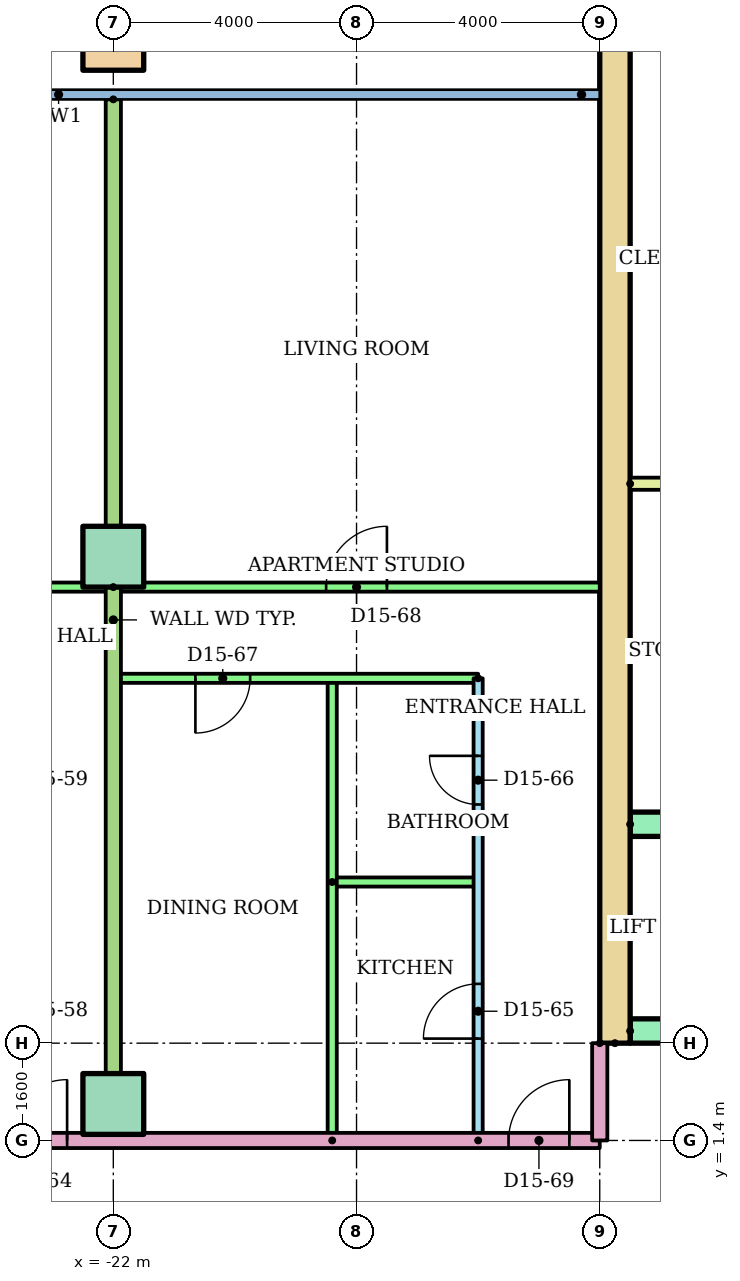
"""IFC4 building model, lengths in metres.
Left out: names, types, materials, properties, quantities, classifications, styles, units other than length and angle.
Written with IfcOpenShell. Run it as: python <this file> out.ifc"""

import sys

from ifc_helpers import new_model, si_unit, direction, frame, frame_2d, origin, origin_2d, place, context, subcontext, project, spatial, rectangle, hollow_rectangle, extrude, element, fill, save


model = new_model("IFC4")
c1 = context("Model", 3, precision=1e-05, world=origin(), true_north=direction((0.0, 1.0)))
c2 = subcontext(c1, "Body", "Model", "MODEL_VIEW")
j1 = project(units=[si_unit("LENGTHUNIT", "METRE"), si_unit("PLANEANGLEUNIT", "RADIAN")], contexts=[c1])
p1 = place(None, origin())
s1 = spatial("IfcSite", under=j1, at=p1, CompositionType="ELEMENT")
p2 = place(p1, origin())
s2 = spatial("IfcBuilding", under=s1, at=p2, CompositionType="ELEMENT")
p3 = place(p2, frame((0.0, 0.0, 57.6)))
s3 = spatial("IfcBuildingStorey", under=s2, at=p3, CompositionType="ELEMENT", Elevation=57.6)
for number, where in (
    (1, (-22.0, 2.0, 0.0)),
    (2, (-22.0, 11.0, 0.0)),
):
    element("IfcColumn", number, at=place(p3, frame(where)), inside=s3, PredefinedType="COLUMN", context=c2, shape_type="SweptSolid", body=[
        extrude(rectangle(XDim=1.0, YDim=1.0, at=origin_2d()), origin(), (0.0, 0.0, 1.0), 3.2),
    ])
p4 = place(p3, frame((-22.0, 19.5, 0.0)))
e3 = element("IfcColumn", 3, at=p4, inside=s3, PredefinedType="COLUMN", context=c2, shape_type="SweptSolid", body=[
    extrude(hollow_rectangle(XDim=1.0, YDim=1.0, WallThickness=0.05, at=origin_2d()), origin(), (0.0, 0.0, 1.0), 3.2),
])
p5 = place(p3, frame((-13.75, 3.0, 0.0), z_axis=(0.0, 0.0, 1.0), x_axis=(0.0, 1.0, 0.0)))
e4 = element("IfcWall", 4, at=p5, inside=s3, PredefinedType="SHEAR", context=c2, shape_type="SweptSolid", body=[
    extrude(rectangle(XDim=17.0, YDim=0.5, at=frame_2d((8.5, 0.0))), origin(), (0.0, 0.0, 1.0), 2.92),
])
p6 = place(p3, frame((-13.5, 3.2, 0.0)))
e5 = element("IfcWall", 5, at=p6, inside=s3, PredefinedType="SHEAR", context=c2, shape_type="SweptSolid", body=[
    extrude(rectangle(XDim=27.0, YDim=0.4, at=frame_2d((13.5, 0.0))), origin(), (0.0, 0.0, 1.0), 2.92),
])
p7 = place(p6, frame((6.861, 0.0, 0.0)))
e6 = element("IfcOpeningElement", 6, at=p7, cuts=e5, PredefinedType="OPENING", context=c2, shape_type="SweptSolid", body=[
    extrude(rectangle(XDim=1.1, YDim=2.1, at=frame_2d((0.55, 1.05))), frame((0.0, 0.21, 0.0), z_axis=(0.0, -1.0, 0.0), x_axis=(1.0, 0.0, 0.0)), (0.0, 0.0, 1.0), 0.42),
])
p8 = place(p6, frame((9.906, 0.0, 0.0)))
e7 = element("IfcOpeningElement", 7, at=p8, cuts=e5, PredefinedType="OPENING", context=c2, shape_type="SweptSolid", body=[
    extrude(rectangle(XDim=1.1, YDim=2.1, at=frame_2d((0.55, 1.05))), frame((0.0, 0.21, 0.0), z_axis=(0.0, -1.0, 0.0), x_axis=(1.0, 0.0, 0.0)), (0.0, 0.0, 1.0), 0.42),
])
p9 = place(p6, frame((15.994, 0.0, 0.0)))
e8 = element("IfcOpeningElement", 8, at=p9, cuts=e5, PredefinedType="OPENING", context=c2, shape_type="SweptSolid", body=[
    extrude(rectangle(XDim=1.1, YDim=2.1, at=frame_2d((0.55, 1.05))), frame((0.0, 0.21, 0.0), z_axis=(0.0, -1.0, 0.0), x_axis=(1.0, 0.0, 0.0)), (0.0, 0.0, 1.0), 0.42),
])
p10 = place(p6, frame((19.039, 0.0, 0.0)))
e9 = element("IfcOpeningElement", 9, at=p10, cuts=e5, PredefinedType="OPENING", context=c2, shape_type="SweptSolid", body=[
    extrude(rectangle(XDim=1.1, YDim=2.1, at=frame_2d((0.55, 1.05))), frame((0.0, 0.21, 0.0), z_axis=(0.0, -1.0, 0.0), x_axis=(1.0, 0.0, 0.0)), (0.0, 0.0, 1.0), 0.42),
])
p11 = place(p6, frame((12.6, 0.0, 0.0)))
e10 = element("IfcOpeningElement", 10, at=p11, cuts=e5, PredefinedType="OPENING", context=c2, shape_type="SweptSolid", body=[
    extrude(rectangle(XDim=1.8, YDim=2.1, at=frame_2d((0.9, 1.05))), frame((0.0, 0.21, 0.0), z_axis=(0.0, -1.0, 0.0), x_axis=(1.0, 0.0, 0.0)), (0.0, 0.0, 1.0), 0.42),
])
p12 = place(p3, frame((-13.5, 6.6, 0.0)))
e11 = element("IfcWall", 11, at=p12, inside=s3, PredefinedType="SHEAR", context=c2, shape_type="SweptSolid", body=[
    extrude(rectangle(XDim=11.978, YDim=0.4, at=frame_2d((5.989, 0.0))), origin(), (0.0, 0.0, 1.0), 2.92),
])
p13 = place(p3, frame((-13.5, 12.2, 0.0)))
e12 = element("IfcWall", 12, at=p13, inside=s3, PredefinedType="PARTITIONING", context=c2, shape_type="SweptSolid", body=[
    extrude(rectangle(XDim=3.9, YDim=0.2, at=frame_2d((1.95, 0.0))), origin(), (0.0, 0.0, 1.0), 2.92),
])
p14 = place(p3, frame((-36.52, 10.5, 0.0)))
e13 = element("IfcWall", 13, at=p14, inside=s3, PredefinedType="PARTITIONING", context=c2, shape_type="SweptSolid", body=[
    extrude(rectangle(XDim=14.52, YDim=0.15, at=frame_2d((7.26, 0.0))), origin(), (0.0, 0.0, 1.0), 2.4),
])
p15 = place(p14, frame((1.97, 0.0, 0.0)))
e14 = element("IfcOpeningElement", 14, at=p15, cuts=e13, PredefinedType="OPENING", context=c2, shape_type="SweptSolid", body=[
    extrude(rectangle(XDim=1.0, YDim=2.1, at=frame_2d((0.5, 1.05))), frame((0.0, 0.085, 0.0), z_axis=(0.0, -1.0, 0.0), x_axis=(1.0, 0.0, 0.0)), (0.0, 0.0, 1.0), 0.17),
])
p16 = place(p14, frame((9.12, 0.0, 0.0)))
e15 = element("IfcOpeningElement", 15, at=p16, cuts=e13, PredefinedType="OPENING", context=c2, shape_type="SweptSolid", body=[
    extrude(rectangle(XDim=1.0, YDim=2.1, at=frame_2d((0.5, 1.05))), frame((0.0, 0.085, 0.0), z_axis=(0.0, -1.0, 0.0), x_axis=(1.0, 0.0, 0.0)), (0.0, 0.0, 1.0), 0.17),
])
p17 = place(p3, frame((-16.0, 1.4, 0.0), z_axis=(0.0, 0.0, 1.0), x_axis=(0.0, 1.0, 0.0)))
e16 = element("IfcWall", 16, at=p17, inside=s3, PredefinedType="PARTITIONING", context=c2, shape_type="SweptSolid", body=[
    extrude(rectangle(XDim=7.6, YDim=0.15, at=frame_2d((3.8, 0.0))), origin(), (0.0, 0.0, 1.0), 2.4),
])
p18 = place(p17, frame((1.675, 0.0, 0.0)))
e17 = element("IfcOpeningElement", 17, at=p18, cuts=e16, PredefinedType="OPENING", context=c2, shape_type="SweptSolid", body=[
    extrude(rectangle(XDim=0.9, YDim=2.1, at=frame_2d((0.45, 1.05))), frame((0.0, 0.085, 0.0), z_axis=(0.0, -1.0, 0.0), x_axis=(1.0, 0.0, 0.0)), (0.0, 0.0, 1.0), 0.17),
])
p19 = place(p17, frame((5.525, 0.0, 0.0)))
e18 = element("IfcOpeningElement", 18, at=p19, cuts=e16, PredefinedType="OPENING", context=c2, shape_type="SweptSolid", body=[
    extrude(rectangle(XDim=0.8, YDim=2.1, at=frame_2d((0.4, 1.05))), frame((0.0, 0.085, 0.0), z_axis=(0.0, -1.0, 0.0), x_axis=(1.0, 0.0, 0.0)), (0.0, 0.0, 1.0), 0.17),
])
p20 = place(p3, frame((-18.4, 5.65, 0.0)))
e19 = element("IfcWall", 19, at=p20, inside=s3, PredefinedType="PARTITIONING", context=c2, shape_type="SweptSolid", body=[
    extrude(rectangle(XDim=2.4, YDim=0.15, at=frame_2d((1.2, 0.0))), origin(), (0.0, 0.0, 1.0), 2.4),
])
p21 = place(p3, frame((-18.4, 1.4, 0.0), z_axis=(0.0, 0.0, 1.0), x_axis=(0.0, 1.0, 0.0)))
e20 = element("IfcWall", 20, at=p21, inside=s3, PredefinedType="PARTITIONING", context=c2, shape_type="SweptSolid", body=[
    extrude(rectangle(XDim=7.6, YDim=0.15, at=frame_2d((3.8, 0.0))), origin(), (0.0, 0.0, 1.0), 2.4),
])
p22 = place(p3, frame((-16.0, 9.0, 0.0), z_axis=(0.0, 0.0, 1.0), x_axis=(-1.0, 0.0, 0.0)))
e21 = element("IfcWall", 21, at=p22, inside=s3, PredefinedType="PARTITIONING", context=c2, shape_type="SweptSolid", body=[
    extrude(rectangle(XDim=6.0, YDim=0.15, at=frame_2d((3.0, 0.0))), origin(), (0.0, 0.0, 1.0), 2.4),
])
p23 = place(p22, frame((3.75, 0.0, 0.0)))
e22 = element("IfcOpeningElement", 22, at=p23, cuts=e21, PredefinedType="OPENING", context=c2, shape_type="SweptSolid", body=[
    extrude(rectangle(XDim=0.9, YDim=2.1, at=frame_2d((0.45, 1.05))), frame((0.0, 0.085, 0.0), z_axis=(0.0, -1.0, 0.0), x_axis=(1.0, 0.0, 0.0)), (0.0, 0.0, 1.0), 0.17),
])
p24 = place(p3, frame((-22.0, 10.5, 0.0)))
e23 = element("IfcWall", 23, at=p24, inside=s3, PredefinedType="PARTITIONING", context=c2, shape_type="SweptSolid", body=[
    extrude(rectangle(XDim=8.0, YDim=0.15, at=frame_2d((4.0, 0.0))), origin(), (0.0, 0.0, 1.0), 2.4),
])
p25 = place(p24, frame((3.5, 0.0, 0.0)))
e24 = element("IfcOpeningElement", 24, at=p25, cuts=e23, PredefinedType="OPENING", context=c2, shape_type="SweptSolid", body=[
    extrude(rectangle(XDim=1.0, YDim=2.1, at=frame_2d((0.5, 1.05))), frame((0.0, 0.085, 0.0), z_axis=(0.0, -1.0, 0.0), x_axis=(1.0, 0.0, 0.0)), (0.0, 0.0, 1.0), 0.17),
])
p26 = place(p3, frame((-22.0, 18.521, 0.0), z_axis=(0.0, 0.0, 1.0), x_axis=(0.0, -1.0, 0.0)))
e25 = element("IfcWall", 25, at=p26, inside=s3, PredefinedType="PARTITIONING", context=c2, shape_type="SweptSolid", body=[
    extrude(rectangle(XDim=17.121, YDim=0.25, at=frame_2d((8.561, 0.0))), origin(), (0.0, 0.0, 1.0), 2.4),
])
p27 = place(p3, frame((-29.0, 1.4, 0.0)))
e26 = element("IfcWall", 26, at=p27, inside=s3, PredefinedType="PARTITIONING", context=c2, shape_type="SweptSolid", body=[
    extrude(rectangle(XDim=15.0, YDim=0.25, at=frame_2d((7.5, 0.0))), origin(), (0.0, 0.0, 1.0), 2.4),
])
p28 = place(p27, frame((5.24, 0.0, 0.0)))
e27 = element("IfcOpeningElement", 27, at=p28, cuts=e26, PredefinedType="OPENING", context=c2, shape_type="SweptSolid", body=[
    extrude(rectangle(XDim=1.0, YDim=2.1, at=frame_2d((0.5, 1.05))), frame((0.0, 0.135, 0.0), z_axis=(0.0, -1.0, 0.0), x_axis=(1.0, 0.0, 0.0)), (0.0, 0.0, 1.0), 0.27),
])
p29 = place(p27, frame((13.5, 0.0, 0.0)))
e28 = element("IfcOpeningElement", 28, at=p29, cuts=e26, PredefinedType="OPENING", context=c2, shape_type="SweptSolid", body=[
    extrude(rectangle(XDim=1.0, YDim=2.1, at=frame_2d((0.5, 1.05))), frame((0.0, 0.135, 0.0), z_axis=(0.0, -1.0, 0.0), x_axis=(1.0, 0.0, 0.0)), (0.0, 0.0, 1.0), 0.27),
])
p30 = place(p3, frame((-14.0, 3.0, 0.0), z_axis=(0.0, 0.0, 1.0), x_axis=(0.0, -1.0, 0.0)))
e29 = element("IfcWall", 29, at=p30, inside=s3, PredefinedType="PARTITIONING", context=c2, shape_type="SweptSolid", body=[
    extrude(rectangle(XDim=1.6, YDim=0.25, at=frame_2d((0.8, 0.0))), origin(), (0.0, 0.0, 1.0), 2.4),
])
p31 = place(p28, origin())
e30 = element("IfcDoor", 30, at=p31, inside=s3, OperationType="SINGLE_SWING_RIGHT", PredefinedType="DOOR", context=c2, shape_type="SweptSolid", body=[
    extrude(rectangle(XDim=1.0, YDim=2.1, at=frame_2d((0.5, 1.05))), frame((0.0, 0.025, 0.0), z_axis=(0.0, -1.0, 0.0), x_axis=(1.0, 0.0, 0.0)), (0.0, 0.0, 1.0), 0.05),
])
fill(e27, e30)
p32 = place(p18, origin())
e31 = element("IfcDoor", 31, at=p32, inside=s3, OperationType="SINGLE_SWING_LEFT", PredefinedType="DOOR", context=c2, shape_type="SweptSolid", body=[
    extrude(rectangle(XDim=0.9, YDim=2.1, at=frame_2d((0.45, 1.05))), frame((0.0, 0.025, 0.0), z_axis=(0.0, -1.0, 0.0), x_axis=(1.0, 0.0, 0.0)), (0.0, 0.0, 1.0), 0.05),
])
fill(e17, e31)
p33 = place(p19, origin())
e32 = element("IfcDoor", 32, at=p33, inside=s3, OperationType="SINGLE_SWING_RIGHT", PredefinedType="DOOR", context=c2, shape_type="SweptSolid", body=[
    extrude(rectangle(XDim=0.8, YDim=2.1, at=frame_2d((0.4, 1.05))), frame((0.0, 0.025, 0.0), z_axis=(0.0, -1.0, 0.0), x_axis=(1.0, 0.0, 0.0)), (0.0, 0.0, 1.0), 0.05),
])
fill(e18, e32)
p34 = place(p23, origin())
e33 = element("IfcDoor", 33, at=p34, inside=s3, OperationType="SINGLE_SWING_RIGHT", PredefinedType="DOOR", context=c2, shape_type="SweptSolid", body=[
    extrude(rectangle(XDim=0.9, YDim=2.1, at=frame_2d((0.45, 1.05))), frame((0.0, 0.025, 0.0), z_axis=(0.0, -1.0, 0.0), x_axis=(1.0, 0.0, 0.0)), (0.0, 0.0, 1.0), 0.05),
])
fill(e22, e33)
p35 = place(p25, origin())
e34 = element("IfcDoor", 34, at=p35, inside=s3, OperationType="SINGLE_SWING_RIGHT", PredefinedType="DOOR", context=c2, shape_type="SweptSolid", body=[
    extrude(rectangle(XDim=1.0, YDim=2.1, at=frame_2d((0.5, 1.05))), frame((0.0, 0.025, 0.0), z_axis=(0.0, -1.0, 0.0), x_axis=(1.0, 0.0, 0.0)), (0.0, 0.0, 1.0), 0.05),
])
fill(e24, e34)
p36 = place(p29, origin())
e35 = element("IfcDoor", 35, at=p36, inside=s3, OperationType="SINGLE_SWING_RIGHT", PredefinedType="DOOR", context=c2, shape_type="SweptSolid", body=[
    extrude(rectangle(XDim=1.0, YDim=2.1, at=frame_2d((0.5, 1.05))), frame((0.0, 0.025, 0.0), z_axis=(0.0, -1.0, 0.0), x_axis=(1.0, 0.0, 0.0)), (0.0, 0.0, 1.0), 0.05),
])
fill(e28, e35)
save(model, sys.argv[1])
